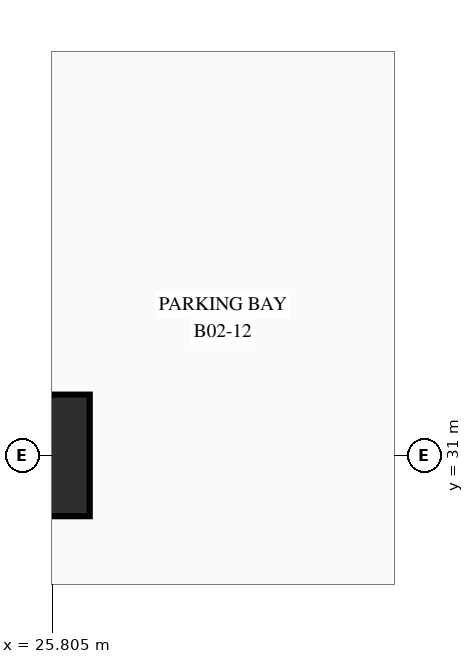
"""IFC4 building model, lengths in metres.
Left out: names, types, materials, properties, quantities, classifications, styles, units other than length and angle.
Written with IfcOpenShell. Run it as: python <this file> out.ifc"""

import sys

from ifc_helpers import new_model, si_unit, direction, frame, origin, origin_2d, place, context, subcontext, project, spatial, rectangle, extrude, element, save


model = new_model("IFC4")
c1 = context("Model", 3, precision=1e-05, world=origin(), true_north=direction((0.0, 1.0)))
c2 = subcontext(c1, "Body", "Model", "MODEL_VIEW")
j1 = project(units=[si_unit("LENGTHUNIT", "METRE"), si_unit("PLANEANGLEUNIT", "RADIAN")], contexts=[c1])
p1 = place(None, origin())
s1 = spatial("IfcSite", under=j1, at=p1, CompositionType="ELEMENT")
p2 = place(p1, origin())
s2 = spatial("IfcBuilding", under=s1, at=p2, CompositionType="ELEMENT")
p3 = place(p2, frame((0.0, 0.0, -9.0)))
s3 = spatial("IfcBuildingStorey", under=s2, at=p3, CompositionType="ELEMENT", Elevation=-9.0)
p4 = place(p3, frame((25.5, 31.0, 0.0), z_axis=(0.0, 0.0, 1.0), x_axis=(1.0, 0.0, 0.0)))
e1 = element("IfcColumn", 1, at=p4, inside=s3, PredefinedType="COLUMN", context=c2, shape_type="SweptSolid", body=[
    extrude(rectangle(XDim=1.6, YDim=1.6, at=origin_2d()), origin(), (0.0, 0.0, 1.0), 4.5),
])
save(model, sys.argv[1])
